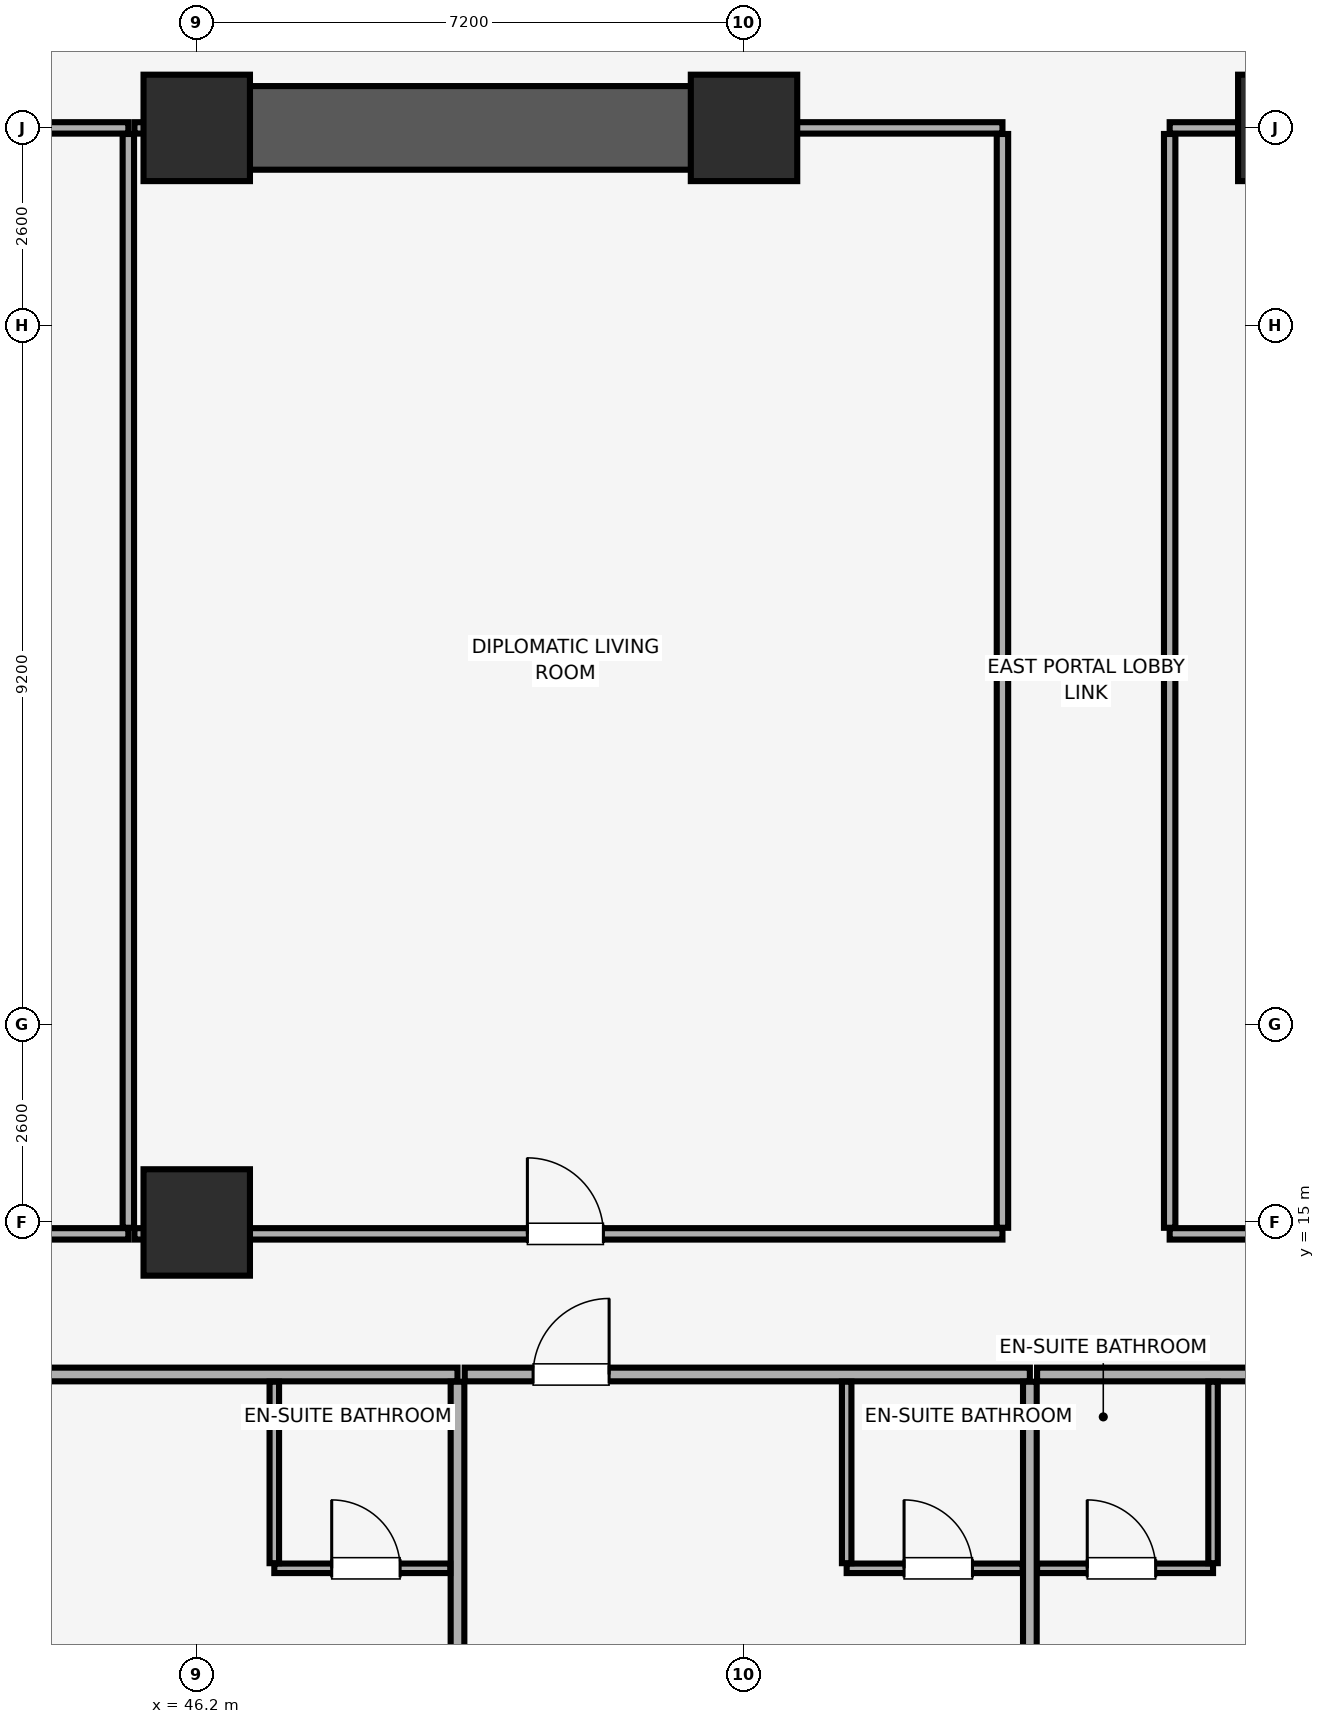
"""IFC4 building model, lengths in metres.
Left out: names, types, materials, properties, quantities, classifications, styles, units other than length and angle.
Written with IfcOpenShell. Run it as: python <this file> out.ifc"""

import sys

from ifc_helpers import new_model, si_unit, direction, frame, frame_2d, origin, origin_2d, place, context, subcontext, project, spatial, rectangle, extrude, element, fill, save


model = new_model("IFC4")
c1 = context("Model", 3, precision=1e-05, world=origin(), true_north=direction((0.0, 1.0)))
c2 = subcontext(c1, "Body", "Model", "MODEL_VIEW")
j1 = project(units=[si_unit("LENGTHUNIT", "METRE"), si_unit("PLANEANGLEUNIT", "RADIAN")], contexts=[c1])
p1 = place(None, origin())
s1 = spatial("IfcSite", under=j1, at=p1, CompositionType="ELEMENT")
p2 = place(p1, origin())
s2 = spatial("IfcBuilding", under=s1, at=p2, CompositionType="ELEMENT")
p3 = place(p2, frame((0.0, 0.0, 68.9)))
s3 = spatial("IfcBuildingStorey", under=s2, at=p3, CompositionType="ELEMENT", Elevation=68.9)
for number, where, z_axis, x_axis in (
    (1, (46.2, 15.0, 0.0), (0.0, 0.0, 1.0), (1.0, 0.0, 0.0)),
    (2, (46.2, 29.4, 0.0), (0.0, 0.0, 1.0), (1.0, 0.0, 0.0)),
    (3, (53.4, 29.4, 0.0), (0.0, 0.0, 1.0), (1.0, 0.0, 0.0)),
    (4, (60.6, 29.4, 0.0), (0.0, 0.0, 1.0), (1.0, 0.0, 0.0)),
):
    element("IfcColumn", number, at=place(p3, frame(where, z_axis=z_axis, x_axis=x_axis)), inside=s3, PredefinedType="COLUMN", context=c2, shape_type="SweptSolid", body=[
        extrude(rectangle(XDim=1.4, YDim=1.4, at=origin_2d()), origin(), (0.0, 0.0, 1.0), 3.51),
    ])
p4 = place(p3, frame((46.0, 29.4, 0.0), z_axis=(0.0, 0.0, 1.0), x_axis=(1.0, 0.0, 0.0)))
e5 = element("IfcWall", 5, at=p4, inside=s3, PredefinedType="SHEAR", context=c2, shape_type="SweptSolid", body=[
    extrude(rectangle(XDim=7.6, YDim=1.1, at=frame_2d((3.8, 0.0))), origin(), (0.0, 0.0, 1.0), 3.51),
])
p5 = place(p3, frame((42.195, 13.0, 0.0), z_axis=(0.0, 0.0, 1.0), x_axis=(1.0, 0.0, 0.0)))
e6 = element("IfcWall", 6, at=p5, inside=s3, PredefinedType="PARTITIONING", context=c2, shape_type="SweptSolid", body=[
    extrude(rectangle(XDim=7.435, YDim=0.18, at=frame_2d((3.718, 0.0))), origin(), (0.0, 0.0, 1.0), 3.51),
])
p6 = place(p5, frame((1.065, 0.0, 0.0)))
e7 = element("IfcOpeningElement", 7, at=p6, cuts=e6, PredefinedType="OPENING", context=c2, shape_type="SweptSolid", body=[
    extrude(rectangle(XDim=1.0, YDim=2.15, at=frame_2d((0.5, 1.075))), frame((0.0, 0.1, 0.0), z_axis=(0.0, -1.0, 0.0), x_axis=(1.0, 0.0, 0.0)), (0.0, 0.0, 1.0), 0.2),
])
p7 = place(p3, frame((49.631, 0.15, 0.0), z_axis=(0.0, 0.0, 1.0), x_axis=(0.0, 1.0, 0.0)))
e8 = element("IfcWall", 8, at=p7, inside=s3, PredefinedType="PARTITIONING", context=c2, shape_type="SweptSolid", body=[
    extrude(rectangle(XDim=12.755, YDim=0.18, at=frame_2d((6.377, 0.0))), origin(), (0.0, 0.0, 1.0), 2.898),
])
p8 = place(p3, frame((47.22, 10.45, 0.0), z_axis=(0.0, 0.0, 1.0), x_axis=(1.0, 0.0, 0.0)))
e9 = element("IfcWall", 9, at=p8, inside=s3, PredefinedType="PARTITIONING", context=c2, shape_type="SweptSolid", body=[
    extrude(rectangle(XDim=2.315, YDim=0.125, at=frame_2d((1.157, 0.0))), origin(), (0.0, 0.0, 1.0), 3.51),
])
p9 = place(p8, frame((0.755, 0.0, 0.0)))
e10 = element("IfcOpeningElement", 10, at=p9, cuts=e9, PredefinedType="OPENING", context=c2, shape_type="SweptSolid", body=[
    extrude(rectangle(XDim=0.9, YDim=2.1, at=frame_2d((0.45, 1.05))), frame((0.0, 0.073, 0.0), z_axis=(0.0, -1.0, 0.0), x_axis=(1.0, 0.0, 0.0)), (0.0, 0.0, 1.0), 0.145),
])
p10 = place(p3, frame((47.22, 10.518, 0.0), z_axis=(0.0, 0.0, 1.0), x_axis=(0.0, 1.0, 0.0)))
e11 = element("IfcWall", 11, at=p10, inside=s3, PredefinedType="PARTITIONING", context=c2, shape_type="SweptSolid", body=[
    extrude(rectangle(XDim=2.387, YDim=0.125, at=frame_2d((1.194, 0.0))), origin(), (0.0, 0.0, 1.0), 3.51),
])
p11 = place(p3, frame((49.726, 13.0, 0.0), z_axis=(0.0, 0.0, 1.0), x_axis=(1.0, 0.0, 0.0)))
e12 = element("IfcWall", 12, at=p11, inside=s3, PredefinedType="PARTITIONING", context=c2, shape_type="SweptSolid", body=[
    extrude(rectangle(XDim=7.435, YDim=0.18, at=frame_2d((3.718, 0.0))), origin(), (0.0, 0.0, 1.0), 3.51),
])
p12 = place(p11, frame((0.9, 0.0, 0.0)))
e13 = element("IfcOpeningElement", 13, at=p12, cuts=e12, PredefinedType="OPENING", context=c2, shape_type="SweptSolid", body=[
    extrude(rectangle(XDim=1.0, YDim=2.15, at=frame_2d((0.5, 1.075))), frame((0.0, 0.1, 0.0), z_axis=(0.0, -1.0, 0.0), x_axis=(1.0, 0.0, 0.0)), (0.0, 0.0, 1.0), 0.2),
])
p13 = place(p3, frame((57.161, 0.15, 0.0), z_axis=(0.0, 0.0, 1.0), x_axis=(0.0, 1.0, 0.0)))
e14 = element("IfcWall", 14, at=p13, inside=s3, PredefinedType="PARTITIONING", context=c2, shape_type="SweptSolid", body=[
    extrude(rectangle(XDim=12.755, YDim=0.18, at=frame_2d((6.377, 0.0))), origin(), (0.0, 0.0, 1.0), 2.898),
])
p14 = place(p3, frame((54.75, 10.45, 0.0), z_axis=(0.0, 0.0, 1.0), x_axis=(1.0, 0.0, 0.0)))
e15 = element("IfcWall", 15, at=p14, inside=s3, PredefinedType="PARTITIONING", context=c2, shape_type="SweptSolid", body=[
    extrude(rectangle(XDim=2.315, YDim=0.125, at=frame_2d((1.158, 0.0))), origin(), (0.0, 0.0, 1.0), 3.51),
])
p15 = place(p14, frame((0.755, 0.0, 0.0)))
e16 = element("IfcOpeningElement", 16, at=p15, cuts=e15, PredefinedType="OPENING", context=c2, shape_type="SweptSolid", body=[
    extrude(rectangle(XDim=0.9, YDim=2.1, at=frame_2d((0.45, 1.05))), frame((0.0, 0.073, 0.0), z_axis=(0.0, -1.0, 0.0), x_axis=(1.0, 0.0, 0.0)), (0.0, 0.0, 1.0), 0.145),
])
p16 = place(p3, frame((54.75, 10.518, 0.0), z_axis=(0.0, 0.0, 1.0), x_axis=(0.0, 1.0, 0.0)))
e17 = element("IfcWall", 17, at=p16, inside=s3, PredefinedType="PARTITIONING", context=c2, shape_type="SweptSolid", body=[
    extrude(rectangle(XDim=2.387, YDim=0.125, at=frame_2d((1.194, 0.0))), origin(), (0.0, 0.0, 1.0), 3.51),
])
p17 = place(p3, frame((57.256, 13.0, 0.0), z_axis=(0.0, 0.0, 1.0), x_axis=(1.0, 0.0, 0.0)))
e18 = element("IfcWall", 18, at=p17, inside=s3, PredefinedType="PARTITIONING", context=c2, shape_type="SweptSolid", body=[
    extrude(rectangle(XDim=7.435, YDim=0.18, at=frame_2d((3.718, 0.0))), origin(), (0.0, 0.0, 1.0), 3.51),
])
p18 = place(p17, frame((5.28, 0.0, 0.0)))
e19 = element("IfcOpeningElement", 19, at=p18, cuts=e18, PredefinedType="OPENING", context=c2, shape_type="SweptSolid", body=[
    extrude(rectangle(XDim=1.0, YDim=2.15, at=frame_2d((0.5, 1.075))), frame((0.0, 0.1, 0.0), z_axis=(0.0, -1.0, 0.0), x_axis=(1.0, 0.0, 0.0)), (0.0, 0.0, 1.0), 0.2),
])
p19 = place(p3, frame((57.256, 10.45, 0.0), z_axis=(0.0, 0.0, 1.0), x_axis=(1.0, 0.0, 0.0)))
e20 = element("IfcWall", 20, at=p19, inside=s3, PredefinedType="PARTITIONING", context=c2, shape_type="SweptSolid", body=[
    extrude(rectangle(XDim=2.315, YDim=0.125, at=frame_2d((1.157, 0.0))), origin(), (0.0, 0.0, 1.0), 3.51),
])
p20 = place(p19, frame((0.66, 0.0, 0.0)))
e21 = element("IfcOpeningElement", 21, at=p20, cuts=e20, PredefinedType="OPENING", context=c2, shape_type="SweptSolid", body=[
    extrude(rectangle(XDim=0.9, YDim=2.1, at=frame_2d((0.45, 1.05))), frame((0.0, 0.073, 0.0), z_axis=(0.0, -1.0, 0.0), x_axis=(1.0, 0.0, 0.0)), (0.0, 0.0, 1.0), 0.145),
])
p21 = place(p3, frame((59.571, 10.518, 0.0), z_axis=(0.0, 0.0, 1.0), x_axis=(0.0, 1.0, 0.0)))
e22 = element("IfcWall", 22, at=p21, inside=s3, PredefinedType="PARTITIONING", context=c2, shape_type="SweptSolid", body=[
    extrude(rectangle(XDim=2.387, YDim=0.125, at=frame_2d((1.194, 0.0))), origin(), (0.0, 0.0, 1.0), 3.51),
])
p22 = place(p3, frame((27.2, 14.85, 0.0), z_axis=(0.0, 0.0, 1.0), x_axis=(1.0, 0.0, 0.0)))
e23 = element("IfcWall", 23, at=p22, inside=s3, PredefinedType="PARTITIONING", context=c2, shape_type="SweptSolid", body=[
    extrude(rectangle(XDim=18.1, YDim=0.15, at=frame_2d((9.05, 0.0))), origin(), (0.0, 0.0, 1.0), 2.86),
])
p23 = place(p22, frame((8.3, 0.0, 0.0)))
e24 = element("IfcOpeningElement", 24, at=p23, cuts=e23, PredefinedType="OPENING", context=c2, shape_type="SweptSolid", body=[
    extrude(rectangle(XDim=1.5, YDim=2.25, at=frame_2d((0.75, 1.125))), frame((0.0, 0.085, 0.0), z_axis=(0.0, -1.0, 0.0), x_axis=(1.0, 0.0, 0.0)), (0.0, 0.0, 1.0), 0.17),
])
p24 = place(p3, frame((38.01, 29.4, 0.0), z_axis=(0.0, 0.0, 1.0), x_axis=(1.0, 0.0, 0.0)))
e25 = element("IfcWall", 25, at=p24, inside=s3, PredefinedType="PARTITIONING", context=c2, shape_type="SweptSolid", body=[
    extrude(rectangle(XDim=7.29, YDim=0.15, at=frame_2d((3.645, 0.0))), origin(), (0.0, 0.0, 1.0), 2.41),
])
p25 = place(p3, frame((45.3, 14.93, 0.0), z_axis=(0.0, 0.0, 1.0), x_axis=(0.0, 1.0, 0.0)))
e26 = element("IfcWall", 26, at=p25, inside=s3, PredefinedType="PARTITIONING", context=c2, shape_type="SweptSolid", body=[
    extrude(rectangle(XDim=14.39, YDim=0.15, at=frame_2d((7.195, 0.0))), origin(), (0.0, 0.0, 1.0), 3.51),
])
p26 = place(p3, frame((45.38, 14.85, 0.0), z_axis=(0.0, 0.0, 1.0), x_axis=(1.0, 0.0, 0.0)))
e27 = element("IfcWall", 27, at=p26, inside=s3, PredefinedType="PARTITIONING", context=c2, shape_type="SweptSolid", body=[
    extrude(rectangle(XDim=11.42, YDim=0.15, at=frame_2d((5.71, 0.0))), origin(), (0.0, 0.0, 1.0), 2.86),
])
p27 = place(p26, frame((5.17, 0.0, 0.0)))
e28 = element("IfcOpeningElement", 28, at=p27, cuts=e27, PredefinedType="OPENING", context=c2, shape_type="SweptSolid", body=[
    extrude(rectangle(XDim=1.0, YDim=2.15, at=frame_2d((0.5, 1.075))), frame((0.0, 0.085, 0.0), z_axis=(0.0, -1.0, 0.0), x_axis=(1.0, 0.0, 0.0)), (0.0, 0.0, 1.0), 0.17),
])
p28 = place(p3, frame((45.38, 29.4, 0.0), z_axis=(0.0, 0.0, 1.0), x_axis=(1.0, 0.0, 0.0)))
e29 = element("IfcWall", 29, at=p28, inside=s3, PredefinedType="PARTITIONING", context=c2, shape_type="SweptSolid", body=[
    extrude(rectangle(XDim=0.61, YDim=0.15, at=frame_2d((0.305, 0.0))), origin(), (0.0, 0.0, 1.0), 2.41),
])
p29 = place(p3, frame((53.61, 29.4, 0.0), z_axis=(0.0, 0.0, 1.0), x_axis=(1.0, 0.0, 0.0)))
e30 = element("IfcWall", 30, at=p29, inside=s3, PredefinedType="PARTITIONING", context=c2, shape_type="SweptSolid", body=[
    extrude(rectangle(XDim=3.19, YDim=0.15, at=frame_2d((1.595, 0.0))), origin(), (0.0, 0.0, 1.0), 2.41),
])
p30 = place(p3, frame((56.8, 14.93, 0.0), z_axis=(0.0, 0.0, 1.0), x_axis=(0.0, 1.0, 0.0)))
e31 = element("IfcWall", 31, at=p30, inside=s3, PredefinedType="PARTITIONING", context=c2, shape_type="SweptSolid", body=[
    extrude(rectangle(XDim=14.39, YDim=0.15, at=frame_2d((7.195, 0.0))), origin(), (0.0, 0.0, 1.0), 2.977),
])
p31 = place(p3, frame((59.0, 14.85, 0.0), z_axis=(0.0, 0.0, 1.0), x_axis=(1.0, 0.0, 0.0)))
e32 = element("IfcWall", 32, at=p31, inside=s3, PredefinedType="PARTITIONING", context=c2, shape_type="SweptSolid", body=[
    extrude(rectangle(XDim=9.2, YDim=0.15, at=frame_2d((4.6, 0.0))), origin(), (0.0, 0.0, 1.0), 2.86),
])
p32 = place(p31, frame((4.1, 0.0, 0.0)))
e33 = element("IfcOpeningElement", 33, at=p32, cuts=e32, PredefinedType="OPENING", context=c2, shape_type="SweptSolid", body=[
    extrude(rectangle(XDim=1.0, YDim=2.15, at=frame_2d((0.5, 1.075))), frame((0.0, 0.085, 0.0), z_axis=(0.0, -1.0, 0.0), x_axis=(1.0, 0.0, 0.0)), (0.0, 0.0, 1.0), 0.17),
])
p33 = place(p3, frame((59.0, 29.4, 0.0), z_axis=(0.0, 0.0, 1.0), x_axis=(1.0, 0.0, 0.0)))
e34 = element("IfcWall", 34, at=p33, inside=s3, PredefinedType="PARTITIONING", context=c2, shape_type="SweptSolid", body=[
    extrude(rectangle(XDim=1.39, YDim=0.15, at=frame_2d((0.695, 0.0))), origin(), (0.0, 0.0, 1.0), 2.41),
])
p34 = place(p3, frame((59.0, 14.93, 0.0), z_axis=(0.0, 0.0, 1.0), x_axis=(0.0, 1.0, 0.0)))
e35 = element("IfcWall", 35, at=p34, inside=s3, PredefinedType="PARTITIONING", context=c2, shape_type="SweptSolid", body=[
    extrude(rectangle(XDim=14.39, YDim=0.15, at=frame_2d((7.195, 0.0))), origin(), (0.0, 0.0, 1.0), 3.51),
])
p35 = place(p9, origin())
e36 = element("IfcDoor", 36, at=p35, inside=s3, OperationType="SINGLE_SWING_LEFT", PredefinedType="DOOR", context=c2, shape_type="SweptSolid", body=[
    extrude(rectangle(XDim=0.9, YDim=2.1, at=frame_2d((0.45, 1.05))), frame((0.0, 0.025, 0.0), z_axis=(0.0, -1.0, 0.0), x_axis=(1.0, 0.0, 0.0)), (0.0, 0.0, 1.0), 0.05),
])
fill(e10, e36)
p36 = place(p12, origin())
e37 = element("IfcDoor", 37, at=p36, inside=s3, OperationType="SINGLE_SWING_RIGHT", PredefinedType="DOOR", context=c2, shape_type="SweptSolid", body=[
    extrude(rectangle(XDim=1.0, YDim=2.15, at=frame_2d((0.5, 1.075))), frame((0.0, 0.025, 0.0), z_axis=(0.0, -1.0, 0.0), x_axis=(1.0, 0.0, 0.0)), (0.0, 0.0, 1.0), 0.05),
])
fill(e13, e37)
p37 = place(p15, origin())
e38 = element("IfcDoor", 38, at=p37, inside=s3, OperationType="SINGLE_SWING_LEFT", PredefinedType="DOOR", context=c2, shape_type="SweptSolid", body=[
    extrude(rectangle(XDim=0.9, YDim=2.1, at=frame_2d((0.45, 1.05))), frame((0.0, 0.025, 0.0), z_axis=(0.0, -1.0, 0.0), x_axis=(1.0, 0.0, 0.0)), (0.0, 0.0, 1.0), 0.05),
])
fill(e16, e38)
p38 = place(p20, origin())
e39 = element("IfcDoor", 39, at=p38, inside=s3, OperationType="SINGLE_SWING_LEFT", PredefinedType="DOOR", context=c2, shape_type="SweptSolid", body=[
    extrude(rectangle(XDim=0.9, YDim=2.1, at=frame_2d((0.45, 1.05))), frame((0.0, 0.025, 0.0), z_axis=(0.0, -1.0, 0.0), x_axis=(1.0, 0.0, 0.0)), (0.0, 0.0, 1.0), 0.05),
])
fill(e21, e39)
p39 = place(p27, origin())
e40 = element("IfcDoor", 40, at=p39, inside=s3, OperationType="SINGLE_SWING_LEFT", PredefinedType="DOOR", context=c2, shape_type="SweptSolid", body=[
    extrude(rectangle(XDim=1.0, YDim=2.15, at=frame_2d((0.5, 1.075))), frame((0.0, 0.025, 0.0), z_axis=(0.0, -1.0, 0.0), x_axis=(1.0, 0.0, 0.0)), (0.0, 0.0, 1.0), 0.05),
])
fill(e28, e40)
save(model, sys.argv[1])
